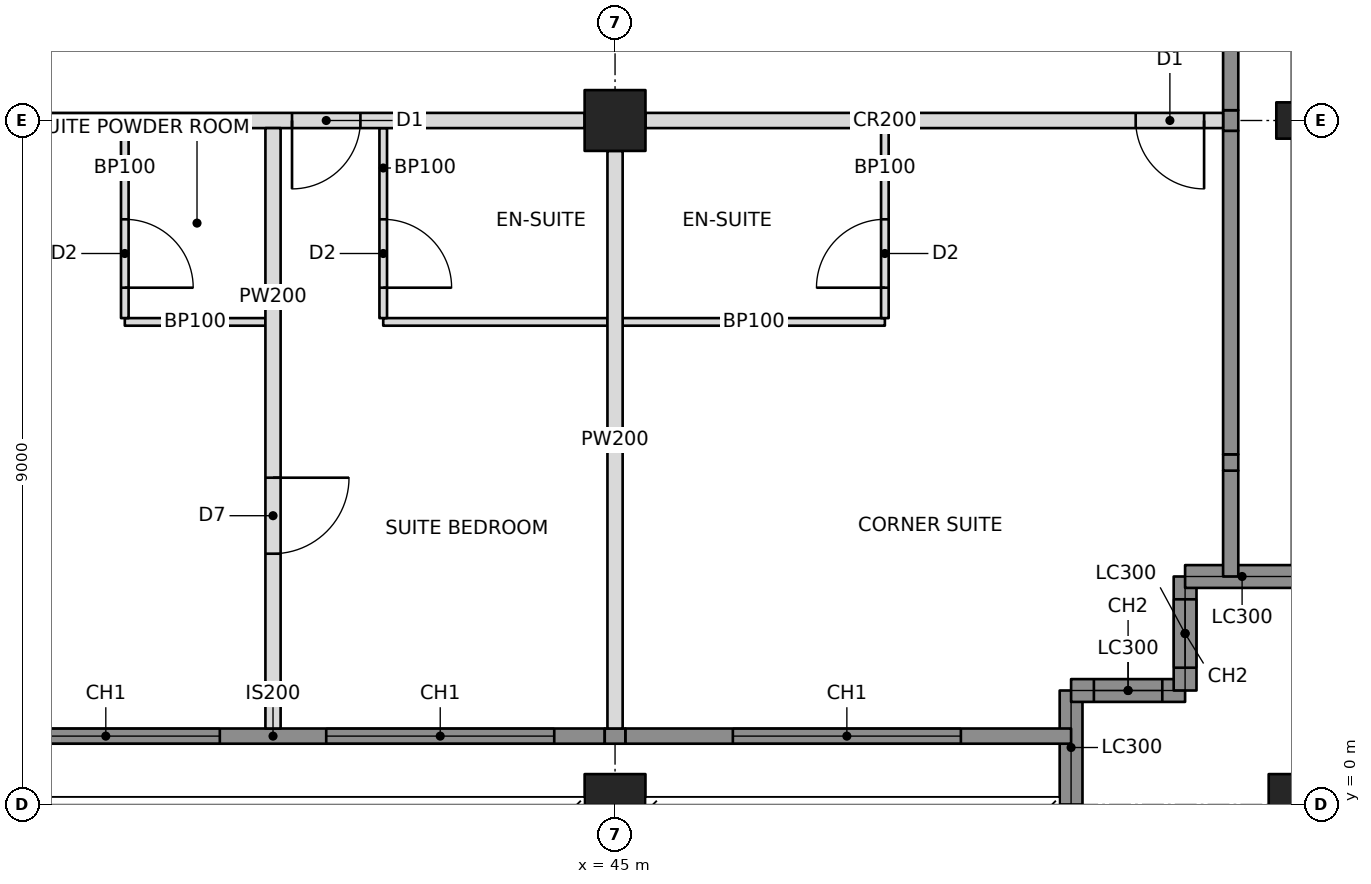
"""IFC4 building model, lengths in metres.
Left out: names, types, materials, properties, quantities, classifications, styles, units other than length and angle.
Written with IfcOpenShell. Run it as: python <this file> out.ifc"""

import sys

from ifc_helpers import new_model, si_unit, direction, frame, frame_2d, origin, origin_2d, place, context, subcontext, project, spatial, rectangle, hollow_rectangle, i_section, extrude, element, fill, save


model = new_model("IFC4")
c1 = context("Model", 3, precision=1e-05, world=origin(), true_north=direction((0.0, 1.0)))
c2 = subcontext(c1, "Body", "Model", "MODEL_VIEW")
j1 = project(units=[si_unit("LENGTHUNIT", "METRE"), si_unit("PLANEANGLEUNIT", "RADIAN")], contexts=[c1])
p1 = place(None, origin())
s1 = spatial("IfcSite", under=j1, at=p1, CompositionType="ELEMENT")
p2 = place(p1, origin())
s2 = spatial("IfcBuilding", under=s1, at=p2, CompositionType="ELEMENT")
p3 = place(p2, frame((0.0, 0.0, 51.8)))
s3 = spatial("IfcBuildingStorey", under=s2, at=p3, CompositionType="ELEMENT", Elevation=51.8)
for number, where, z_axis, x_axis in (
    (1, (45.0, 0.0, 0.0), (0.0, 0.0, 1.0), (1.0, 0.0, 0.0)),
    (2, (45.0, 9.0, 0.0), (0.0, 0.0, 1.0), (0.0, 1.0, 0.0)),
    (3, (54.0, 0.0, 0.0), (0.0, 0.0, 1.0), (1.0, 0.0, 0.0)),
):
    element("IfcColumn", number, at=place(p3, frame(where, z_axis=z_axis, x_axis=x_axis)), inside=s3, PredefinedType="COLUMN", context=c2, shape_type="SweptSolid", body=[
        extrude(hollow_rectangle(XDim=0.8, YDim=0.8, WallThickness=0.1, at=origin_2d()), origin(), (0.0, 0.0, 1.0), 3.4),
    ])
p4 = place(p3, frame((54.0, 9.0, 0.0), z_axis=(0.0, 0.0, 1.0), x_axis=(0.0, 1.0, 0.0)))
e4 = element("IfcColumn", 4, at=p4, inside=s3, PredefinedType="COLUMN", context=c2, shape_type="SweptSolid", body=[
    extrude(i_section(OverallWidth=0.478, OverallDepth=0.599, WebThickness=0.1, FlangeThickness=0.14, at=origin_2d()), origin(), (0.0, 0.0, 1.0), 3.4),
])
p5 = place(p3, frame((51.0, 0.0, 0.0), z_axis=(0.0, 0.0, 1.0), x_axis=(0.0, 1.0, 0.0)))
e5 = element("IfcWall", 5, at=p5, inside=s3, PredefinedType="SOLIDWALL", context=c2, shape_type="SweptSolid", body=[
    extrude(rectangle(XDim=1.5, YDim=0.3, at=frame_2d((0.75, 0.0))), origin(), (0.0, 0.0, 1.0), 2.42),
])
p6 = place(p3, frame((51.0, 1.5, 0.0), z_axis=(0.0, 0.0, 1.0), x_axis=(1.0, 0.0, 0.0)))
e6 = element("IfcWall", 6, at=p6, inside=s3, PredefinedType="SOLIDWALL", context=c2, shape_type="SweptSolid", body=[
    extrude(rectangle(XDim=1.5, YDim=0.3, at=frame_2d((0.75, 0.0))), origin(), (0.0, 0.0, 1.0), 3.2),
])
p7 = place(p6, frame((0.3, 0.0, 0.6)))
e7 = element("IfcOpeningElement", 7, at=p7, cuts=e6, PredefinedType="OPENING", context=c2, shape_type="SweptSolid", body=[
    extrude(rectangle(XDim=0.9, YDim=2.2, at=frame_2d((0.45, 1.1))), frame((0.0, 0.16, 0.0), z_axis=(0.0, -1.0, 0.0), x_axis=(1.0, 0.0, 0.0)), (0.0, 0.0, 1.0), 0.32),
])
p8 = place(p3, frame((52.5, 1.5, 0.0), z_axis=(0.0, 0.0, 1.0), x_axis=(0.0, 1.0, 0.0)))
e8 = element("IfcWall", 8, at=p8, inside=s3, PredefinedType="SOLIDWALL", context=c2, shape_type="SweptSolid", body=[
    extrude(rectangle(XDim=1.5, YDim=0.3, at=frame_2d((0.75, 0.0))), origin(), (0.0, 0.0, 1.0), 3.2),
])
p9 = place(p8, frame((0.3, 0.0, 0.6)))
e9 = element("IfcOpeningElement", 9, at=p9, cuts=e8, PredefinedType="OPENING", context=c2, shape_type="SweptSolid", body=[
    extrude(rectangle(XDim=0.9, YDim=2.2, at=frame_2d((0.45, 1.1))), frame((0.0, 0.16, 0.0), z_axis=(0.0, -1.0, 0.0), x_axis=(1.0, 0.0, 0.0)), (0.0, 0.0, 1.0), 0.32),
])
p10 = place(p3, frame((52.5, 3.0, 0.0), z_axis=(0.0, 0.0, 1.0), x_axis=(1.0, 0.0, 0.0)))
e10 = element("IfcWall", 10, at=p10, inside=s3, PredefinedType="SOLIDWALL", context=c2, shape_type="SweptSolid", body=[
    extrude(rectangle(XDim=1.5, YDim=0.3, at=frame_2d((0.75, 0.0))), origin(), (0.0, 0.0, 1.0), 2.42),
])
p11 = place(p3, frame((53.1, 3.0, 0.0), z_axis=(0.0, 0.0, 1.0), x_axis=(0.0, 1.0, 0.0)))
e11 = element("IfcWall", 11, at=p11, inside=s3, PredefinedType="SOLIDWALL", context=c2, shape_type="SweptSolid", body=[
    extrude(rectangle(XDim=1.393, YDim=0.2, at=frame_2d((0.696, 0.0))), origin(), (0.0, 0.0, 1.0), 3.2),
])
p12 = place(p3, frame((36.4, 9.0, 0.0), z_axis=(0.0, 0.0, 1.0), x_axis=(1.0, 0.0, 0.0)))
e12 = element("IfcWall", 12, at=p12, inside=s3, PredefinedType="PARTITIONING", context=c2, shape_type="SweptSolid", body=[
    extrude(rectangle(XDim=8.2, YDim=0.2, at=frame_2d((4.1, 0.0))), origin(), (0.0, 0.0, 1.0), 2.438),
])
p13 = place(p12, frame((4.35, 0.0, 0.0)))
e13 = element("IfcOpeningElement", 13, at=p13, cuts=e12, PredefinedType="OPENING", context=c2, shape_type="SweptSolid", body=[
    extrude(rectangle(XDim=0.9, YDim=2.1, at=frame_2d((0.45, 1.05))), frame((0.0, 0.11, 0.0), z_axis=(0.0, -1.0, 0.0), x_axis=(1.0, 0.0, 0.0)), (0.0, 0.0, 1.0), 0.22),
])
p14 = place(p3, frame((45.4, 9.0, 0.0), z_axis=(0.0, 0.0, 1.0), x_axis=(1.0, 0.0, 0.0)))
e14 = element("IfcWall", 14, at=p14, inside=s3, PredefinedType="PARTITIONING", context=c2, shape_type="SweptSolid", body=[
    extrude(rectangle(XDim=7.6, YDim=0.2, at=frame_2d((3.8, 0.0))), origin(), (0.0, 0.0, 1.0), 2.438),
])
p15 = place(p14, frame((6.45, 0.0, 0.0)))
e15 = element("IfcOpeningElement", 15, at=p15, cuts=e14, PredefinedType="OPENING", context=c2, shape_type="SweptSolid", body=[
    extrude(rectangle(XDim=0.9, YDim=2.1, at=frame_2d((0.45, 1.05))), frame((0.0, 0.11, 0.0), z_axis=(0.0, -1.0, 0.0), x_axis=(1.0, 0.0, 0.0)), (0.0, 0.0, 1.0), 0.22),
])
p16 = place(p3, frame((40.5, 8.9, 0.0), z_axis=(0.0, 0.0, 1.0), x_axis=(0.0, -1.0, 0.0)))
e16 = element("IfcWall", 16, at=p16, inside=s3, PredefinedType="PARTITIONING", context=c2, shape_type="SweptSolid", body=[
    extrude(rectangle(XDim=7.9, YDim=0.2, at=frame_2d((3.95, 0.0))), origin(), (0.0, 0.0, 1.0), 2.438),
])
p17 = place(p16, frame((4.6, 0.0, 0.0)))
e17 = element("IfcOpeningElement", 17, at=p17, cuts=e16, PredefinedType="OPENING", context=c2, shape_type="SweptSolid", body=[
    extrude(rectangle(XDim=1.0, YDim=2.1, at=frame_2d((0.5, 1.05))), frame((0.0, 0.11, 0.0), z_axis=(0.0, -1.0, 0.0), x_axis=(1.0, 0.0, 0.0)), (0.0, 0.0, 1.0), 0.22),
])
p18 = place(p3, frame((45.0, 8.6, 0.0), z_axis=(0.0, 0.0, 1.0), x_axis=(0.0, -1.0, 0.0)))
e18 = element("IfcWall", 18, at=p18, inside=s3, PredefinedType="PARTITIONING", context=c2, shape_type="SweptSolid", body=[
    extrude(rectangle(XDim=7.6, YDim=0.2, at=frame_2d((3.8, 0.0))), origin(), (0.0, 0.0, 1.0), 2.438),
])
p19 = place(p3, frame((38.55, 6.35, 0.0), z_axis=(0.0, 0.0, 1.0), x_axis=(1.0, 0.0, 0.0)))
e19 = element("IfcWall", 19, at=p19, inside=s3, PredefinedType="PARTITIONING", context=c2, shape_type="SweptSolid", body=[
    extrude(rectangle(XDim=1.85, YDim=0.1, at=frame_2d((0.925, 0.0))), origin(), (0.0, 0.0, 1.0), 3.2),
])
p20 = place(p3, frame((38.55, 8.9, 0.0), z_axis=(0.0, 0.0, 1.0), x_axis=(0.0, -1.0, 0.0)))
e20 = element("IfcWall", 20, at=p20, inside=s3, PredefinedType="PARTITIONING", context=c2, shape_type="SweptSolid", body=[
    extrude(rectangle(XDim=2.5, YDim=0.1, at=frame_2d((1.25, 0.0))), origin(), (0.0, 0.0, 1.0), 2.438),
])
p21 = place(p20, frame((1.2, 0.0, 0.0)))
e21 = element("IfcOpeningElement", 21, at=p21, cuts=e20, PredefinedType="OPENING", context=c2, shape_type="SweptSolid", body=[
    extrude(rectangle(XDim=0.9, YDim=2.1, at=frame_2d((0.45, 1.05))), frame((0.0, 0.06, 0.0), z_axis=(0.0, -1.0, 0.0), x_axis=(1.0, 0.0, 0.0)), (0.0, 0.0, 1.0), 0.12),
])
p22 = place(p3, frame((41.95, 6.35, 0.0), z_axis=(0.0, 0.0, 1.0), x_axis=(1.0, 0.0, 0.0)))
e22 = element("IfcWall", 22, at=p22, inside=s3, PredefinedType="PARTITIONING", context=c2, shape_type="SweptSolid", body=[
    extrude(rectangle(XDim=2.95, YDim=0.1, at=frame_2d((1.475, 0.0))), origin(), (0.0, 0.0, 1.0), 2.438),
])
p23 = place(p3, frame((41.95, 8.9, 0.0), z_axis=(0.0, 0.0, 1.0), x_axis=(0.0, -1.0, 0.0)))
e23 = element("IfcWall", 23, at=p23, inside=s3, PredefinedType="PARTITIONING", context=c2, shape_type="SweptSolid", body=[
    extrude(rectangle(XDim=2.5, YDim=0.1, at=frame_2d((1.25, 0.0))), origin(), (0.0, 0.0, 1.0), 2.438),
])
p24 = place(p23, frame((1.2, 0.0, 0.0)))
e24 = element("IfcOpeningElement", 24, at=p24, cuts=e23, PredefinedType="OPENING", context=c2, shape_type="SweptSolid", body=[
    extrude(rectangle(XDim=0.9, YDim=2.1, at=frame_2d((0.45, 1.05))), frame((0.0, 0.06, 0.0), z_axis=(0.0, -1.0, 0.0), x_axis=(1.0, 0.0, 0.0)), (0.0, 0.0, 1.0), 0.12),
])
p25 = place(p3, frame((45.1, 6.35, 0.0), z_axis=(0.0, 0.0, 1.0), x_axis=(1.0, 0.0, 0.0)))
e25 = element("IfcWall", 25, at=p25, inside=s3, PredefinedType="PARTITIONING", context=c2, shape_type="SweptSolid", body=[
    extrude(rectangle(XDim=3.45, YDim=0.1, at=frame_2d((1.725, 0.0))), origin(), (0.0, 0.0, 1.0), 2.438),
])
p26 = place(p3, frame((48.55, 8.9, 0.0), z_axis=(0.0, 0.0, 1.0), x_axis=(0.0, -1.0, 0.0)))
e26 = element("IfcWall", 26, at=p26, inside=s3, PredefinedType="PARTITIONING", context=c2, shape_type="SweptSolid", body=[
    extrude(rectangle(XDim=2.5, YDim=0.1, at=frame_2d((1.25, 0.0))), origin(), (0.0, 0.0, 1.0), 2.438),
])
p27 = place(p26, frame((1.2, 0.0, 0.0)))
e27 = element("IfcOpeningElement", 27, at=p27, cuts=e26, PredefinedType="OPENING", context=c2, shape_type="SweptSolid", body=[
    extrude(rectangle(XDim=0.9, YDim=2.1, at=frame_2d((0.45, 1.05))), frame((0.0, 0.06, 0.0), z_axis=(0.0, -1.0, 0.0), x_axis=(1.0, 0.0, 0.0)), (0.0, 0.0, 1.0), 0.12),
])
p28 = place(p3, frame((36.135, 0.9, 0.0), z_axis=(0.0, 0.0, 1.0), x_axis=(1.0, 0.0, 0.0)))
e28 = element("IfcWall", 28, at=p28, inside=s3, PredefinedType="SOLIDWALL", context=c2, shape_type="SweptSolid", body=[
    extrude(rectangle(XDim=8.729, YDim=0.2, at=frame_2d((4.365, 0.0))), origin(), (0.0, 0.0, 1.0), 3.2),
])
p29 = place(p28, frame((0.665, 0.0, 0.6)))
e29 = element("IfcOpeningElement", 29, at=p29, cuts=e28, PredefinedType="OPENING", context=c2, shape_type="SweptSolid", body=[
    extrude(rectangle(XDim=3.0, YDim=2.2, at=frame_2d((1.5, 1.1))), frame((0.0, 0.11, 0.0), z_axis=(0.0, -1.0, 0.0), x_axis=(1.0, 0.0, 0.0)), (0.0, 0.0, 1.0), 0.22),
])
p30 = place(p28, frame((5.065, 0.0, 0.6)))
e30 = element("IfcOpeningElement", 30, at=p30, cuts=e28, PredefinedType="OPENING", context=c2, shape_type="SweptSolid", body=[
    extrude(rectangle(XDim=3.0, YDim=2.2, at=frame_2d((1.5, 1.1))), frame((0.0, 0.11, 0.0), z_axis=(0.0, -1.0, 0.0), x_axis=(1.0, 0.0, 0.0)), (0.0, 0.0, 1.0), 0.22),
])
p31 = place(p3, frame((44.865, 0.9, 0.0), z_axis=(0.0, 0.0, 1.0), x_axis=(1.0, 0.0, 0.0)))
e31 = element("IfcWall", 31, at=p31, inside=s3, PredefinedType="SOLIDWALL", context=c2, shape_type="SweptSolid", body=[
    extrude(rectangle(XDim=0.271, YDim=0.2, at=frame_2d((0.135, 0.0))), origin(), (0.0, 0.0, 1.0), 2.438),
])
p32 = place(p3, frame((45.135, 0.9, 0.0), z_axis=(0.0, 0.0, 1.0), x_axis=(1.0, 0.0, 0.0)))
e32 = element("IfcWall", 32, at=p32, inside=s3, PredefinedType="SOLIDWALL", context=c2, shape_type="SweptSolid", body=[
    extrude(rectangle(XDim=5.865, YDim=0.2, at=frame_2d((2.932, 0.0))), origin(), (0.0, 0.0, 1.0), 3.2),
])
p33 = place(p32, frame((1.415, 0.0, 0.6)))
e33 = element("IfcOpeningElement", 33, at=p33, cuts=e32, PredefinedType="OPENING", context=c2, shape_type="SweptSolid", body=[
    extrude(rectangle(XDim=3.0, YDim=2.2, at=frame_2d((1.5, 1.1))), frame((0.0, 0.11, 0.0), z_axis=(0.0, -1.0, 0.0), x_axis=(1.0, 0.0, 0.0)), (0.0, 0.0, 1.0), 0.22),
])
p34 = place(p3, frame((53.1, 4.393, 0.0), z_axis=(0.0, 0.0, 1.0), x_axis=(0.0, 1.0, 0.0)))
e34 = element("IfcWall", 34, at=p34, inside=s3, PredefinedType="SOLIDWALL", context=c2, shape_type="SweptSolid", body=[
    extrude(rectangle(XDim=0.215, YDim=0.2, at=frame_2d((0.107, 0.0))), origin(), (0.0, 0.0, 1.0), 2.661),
])
p35 = place(p3, frame((53.1, 4.607, 0.0), z_axis=(0.0, 0.0, 1.0), x_axis=(0.0, 1.0, 0.0)))
e35 = element("IfcWall", 35, at=p35, inside=s3, PredefinedType="SOLIDWALL", context=c2, shape_type="SweptSolid", body=[
    extrude(rectangle(XDim=4.257, YDim=0.2, at=frame_2d((2.129, 0.0))), origin(), (0.0, 0.0, 1.0), 3.2),
])
p36 = place(p3, frame((53.1, 8.865, 0.0), z_axis=(0.0, 0.0, 1.0), x_axis=(0.0, 1.0, 0.0)))
e36 = element("IfcWall", 36, at=p36, inside=s3, PredefinedType="SOLIDWALL", context=c2, shape_type="SweptSolid", body=[
    extrude(rectangle(XDim=0.271, YDim=0.2, at=frame_2d((0.135, 0.0))), origin(), (0.0, 0.0, 1.0), 2.438),
])
p37 = place(p3, frame((53.1, 9.135, 0.0), z_axis=(0.0, 0.0, 1.0), x_axis=(0.0, 1.0, 0.0)))
e37 = element("IfcWall", 37, at=p37, inside=s3, PredefinedType="SOLIDWALL", context=c2, shape_type="SweptSolid", body=[
    extrude(rectangle(XDim=8.729, YDim=0.2, at=frame_2d((4.365, 0.0))), origin(), (0.0, 0.0, 1.0), 3.2),
])
p38 = place(p37, frame((2.015, 0.0, 0.6)))
e38 = element("IfcOpeningElement", 38, at=p38, cuts=e37, PredefinedType="OPENING", context=c2, shape_type="SweptSolid", body=[
    extrude(rectangle(XDim=3.0, YDim=2.2, at=frame_2d((1.5, 1.1))), frame((0.0, 0.11, 0.0), z_axis=(0.0, -1.0, 0.0), x_axis=(1.0, 0.0, 0.0)), (0.0, 0.0, 1.0), 0.22),
])
p39 = place(p37, frame((5.515, 0.0, 0.6)))
e39 = element("IfcOpeningElement", 39, at=p39, cuts=e37, PredefinedType="OPENING", context=c2, shape_type="SweptSolid", body=[
    extrude(rectangle(XDim=3.0, YDim=2.2, at=frame_2d((1.5, 1.1))), frame((0.0, 0.11, 0.0), z_axis=(0.0, -1.0, 0.0), x_axis=(1.0, 0.0, 0.0)), (0.0, 0.0, 1.0), 0.22),
])
p40 = place(p7, origin())
e40 = element("IfcWindow", 40, at=p40, inside=s3, PartitioningType="SINGLE_PANEL", PredefinedType="WINDOW", context=c2, shape_type="SweptSolid", body=[
    extrude(rectangle(XDim=0.9, YDim=2.2, at=frame_2d((0.45, 1.1))), frame((0.0, 0.03, 0.0), z_axis=(0.0, -1.0, 0.0), x_axis=(1.0, 0.0, 0.0)), (0.0, 0.0, 1.0), 0.06),
])
fill(e7, e40)
p41 = place(p9, origin())
e41 = element("IfcWindow", 41, at=p41, inside=s3, PartitioningType="SINGLE_PANEL", PredefinedType="WINDOW", context=c2, shape_type="SweptSolid", body=[
    extrude(rectangle(XDim=0.9, YDim=2.2, at=frame_2d((0.45, 1.1))), frame((0.0, 0.03, 0.0), z_axis=(0.0, -1.0, 0.0), x_axis=(1.0, 0.0, 0.0)), (0.0, 0.0, 1.0), 0.06),
])
fill(e9, e41)
p42 = place(p29, origin())
e42 = element("IfcWindow", 42, at=p42, inside=s3, PartitioningType="TRIPLE_PANEL_VERTICAL", PredefinedType="WINDOW", context=c2, shape_type="SweptSolid", body=[
    extrude(rectangle(XDim=3.0, YDim=2.2, at=frame_2d((1.5, 1.1))), frame((0.0, 0.03, 0.0), z_axis=(0.0, -1.0, 0.0), x_axis=(1.0, 0.0, 0.0)), (0.0, 0.0, 1.0), 0.06),
])
fill(e29, e42)
p43 = place(p30, origin())
e43 = element("IfcWindow", 43, at=p43, inside=s3, PartitioningType="TRIPLE_PANEL_VERTICAL", PredefinedType="WINDOW", context=c2, shape_type="SweptSolid", body=[
    extrude(rectangle(XDim=3.0, YDim=2.2, at=frame_2d((1.5, 1.1))), frame((0.0, 0.03, 0.0), z_axis=(0.0, -1.0, 0.0), x_axis=(1.0, 0.0, 0.0)), (0.0, 0.0, 1.0), 0.06),
])
fill(e30, e43)
p44 = place(p33, origin())
e44 = element("IfcWindow", 44, at=p44, inside=s3, PartitioningType="TRIPLE_PANEL_VERTICAL", PredefinedType="WINDOW", context=c2, shape_type="SweptSolid", body=[
    extrude(rectangle(XDim=3.0, YDim=2.2, at=frame_2d((1.5, 1.1))), frame((0.0, 0.03, 0.0), z_axis=(0.0, -1.0, 0.0), x_axis=(1.0, 0.0, 0.0)), (0.0, 0.0, 1.0), 0.06),
])
fill(e33, e44)
p45 = place(p17, origin())
e45 = element("IfcDoor", 45, at=p45, inside=s3, OperationType="SINGLE_SWING_LEFT", PredefinedType="DOOR", context=c2, shape_type="SweptSolid", body=[
    extrude(rectangle(XDim=1.0, YDim=2.1, at=frame_2d((0.5, 1.05))), frame((0.0, 0.025, 0.0), z_axis=(0.0, -1.0, 0.0), x_axis=(1.0, 0.0, 0.0)), (0.0, 0.0, 1.0), 0.05),
])
fill(e17, e45)
p46 = place(p21, origin())
e46 = element("IfcDoor", 46, at=p46, inside=s3, OperationType="SINGLE_SWING_RIGHT", PredefinedType="DOOR", context=c2, shape_type="SweptSolid", body=[
    extrude(rectangle(XDim=0.9, YDim=2.1, at=frame_2d((0.45, 1.05))), frame((0.0, 0.025, 0.0), z_axis=(0.0, -1.0, 0.0), x_axis=(1.0, 0.0, 0.0)), (0.0, 0.0, 1.0), 0.05),
])
fill(e21, e46)
p47 = place(p24, origin())
e47 = element("IfcDoor", 47, at=p47, inside=s3, OperationType="SINGLE_SWING_RIGHT", PredefinedType="DOOR", context=c2, shape_type="SweptSolid", body=[
    extrude(rectangle(XDim=0.9, YDim=2.1, at=frame_2d((0.45, 1.05))), frame((0.0, 0.025, 0.0), z_axis=(0.0, -1.0, 0.0), x_axis=(1.0, 0.0, 0.0)), (0.0, 0.0, 1.0), 0.05),
])
fill(e24, e47)
p48 = place(p13, frame((0.9, 0.0, 0.0), z_axis=(0.0, 0.0, 1.0), x_axis=(-1.0, 0.0, 0.0)))
e48 = element("IfcDoor", 48, at=p48, inside=s3, OperationType="SINGLE_SWING_RIGHT", PredefinedType="DOOR", context=c2, shape_type="SweptSolid", body=[
    extrude(rectangle(XDim=0.9, YDim=2.1, at=frame_2d((0.45, 1.05))), frame((0.0, 0.025, 0.0), z_axis=(0.0, -1.0, 0.0), x_axis=(1.0, 0.0, 0.0)), (0.0, 0.0, 1.0), 0.05),
])
fill(e13, e48)
p49 = place(p27, frame((0.9, 0.0, 0.0), z_axis=(0.0, 0.0, 1.0), x_axis=(-1.0, 0.0, 0.0)))
e49 = element("IfcDoor", 49, at=p49, inside=s3, OperationType="SINGLE_SWING_LEFT", PredefinedType="DOOR", context=c2, shape_type="SweptSolid", body=[
    extrude(rectangle(XDim=0.9, YDim=2.1, at=frame_2d((0.45, 1.05))), frame((0.0, 0.025, 0.0), z_axis=(0.0, -1.0, 0.0), x_axis=(1.0, 0.0, 0.0)), (0.0, 0.0, 1.0), 0.05),
])
fill(e27, e49)
p50 = place(p15, frame((0.9, 0.0, 0.0), z_axis=(0.0, 0.0, 1.0), x_axis=(-1.0, 0.0, 0.0)))
e50 = element("IfcDoor", 50, at=p50, inside=s3, OperationType="SINGLE_SWING_LEFT", PredefinedType="DOOR", context=c2, shape_type="SweptSolid", body=[
    extrude(rectangle(XDim=0.9, YDim=2.1, at=frame_2d((0.45, 1.05))), frame((0.0, 0.025, 0.0), z_axis=(0.0, -1.0, 0.0), x_axis=(1.0, 0.0, 0.0)), (0.0, 0.0, 1.0), 0.05),
])
fill(e15, e50)
save(model, sys.argv[1])
